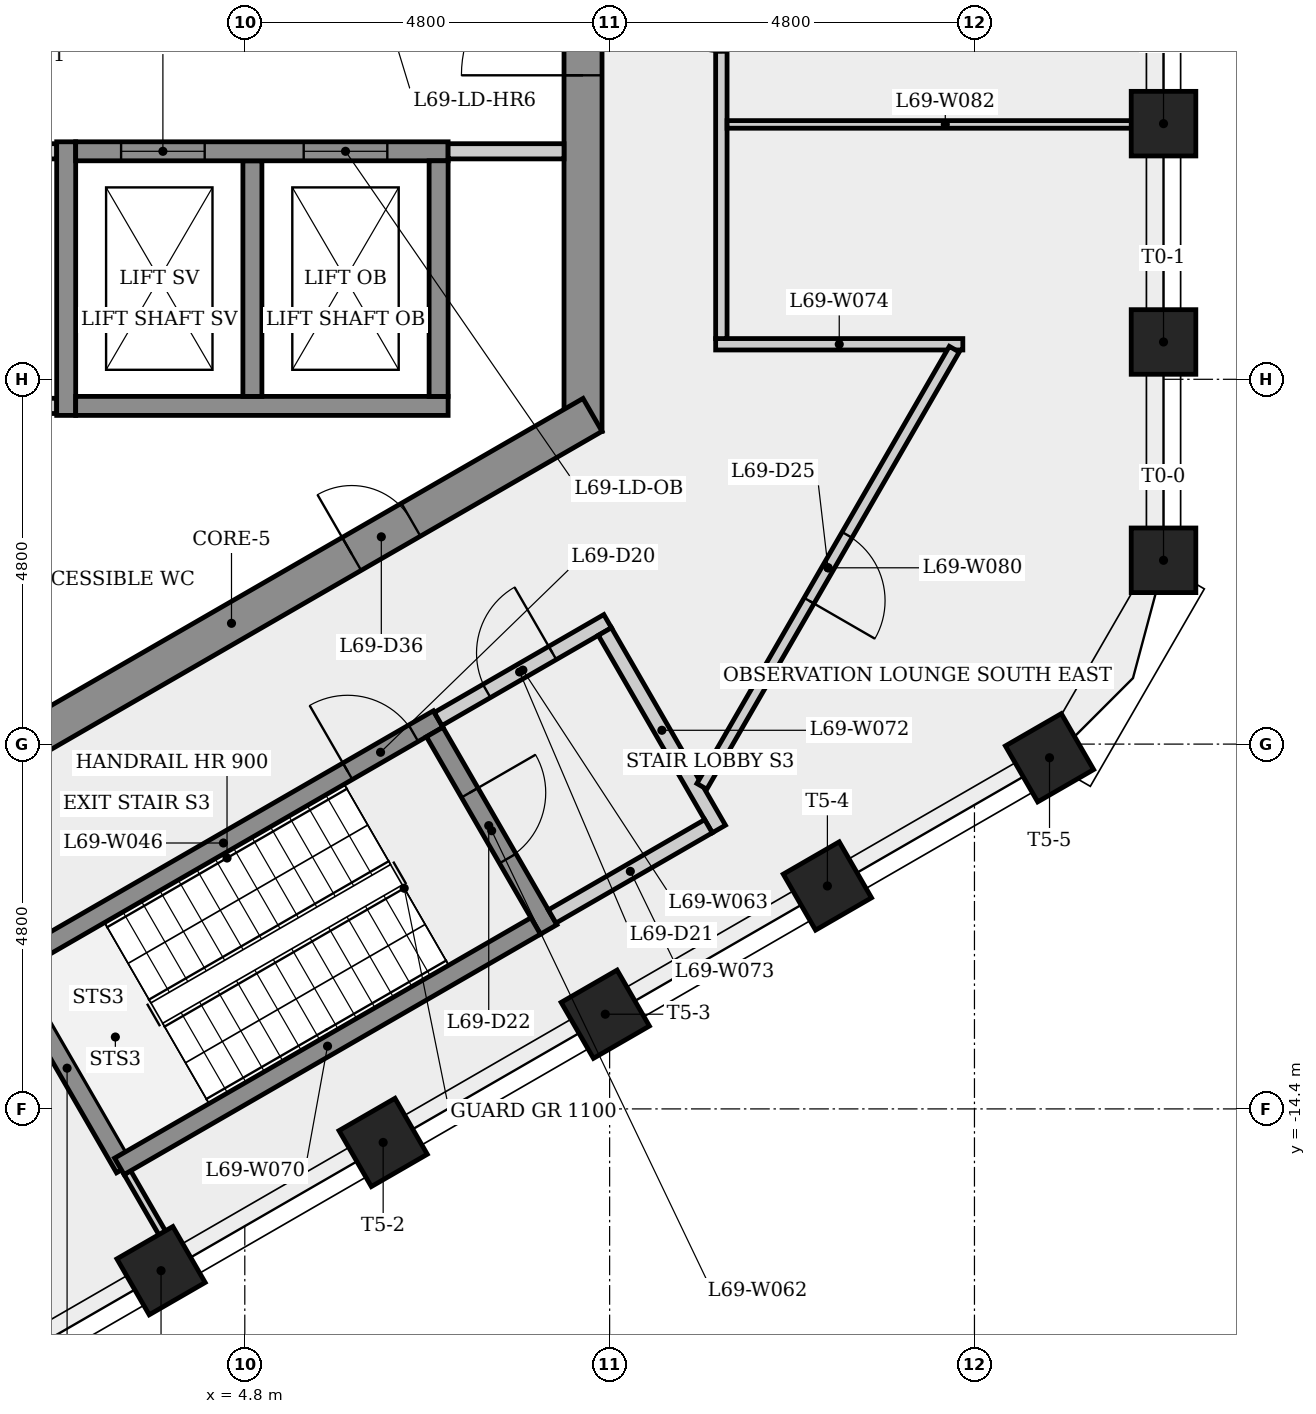
"""IFC4 building model, lengths in metres.
Left out: names, types, materials, properties, quantities, classifications, styles, units other than length and angle.
Written with IfcOpenShell. Run it as: python <this file> out.ifc"""

import sys

from ifc_helpers import new_model, si_unit, direction, frame, frame_2d, origin, origin_2d, place, context, subcontext, project, spatial, rectangle, extrude, element, fill, save


model = new_model("IFC4")
c1 = context("Model", 3, precision=1e-05, world=origin(), true_north=direction((0.0, 1.0)))
c2 = subcontext(c1, "Body", "Model", "MODEL_VIEW")
j1 = project(units=[si_unit("LENGTHUNIT", "METRE"), si_unit("PLANEANGLEUNIT", "RADIAN")], contexts=[c1])
p1 = place(None, origin())
s1 = spatial("IfcSite", under=j1, at=p1, CompositionType="ELEMENT")
p2 = place(p1, origin())
s2 = spatial("IfcBuilding", under=s1, at=p2, CompositionType="ELEMENT")
p3 = place(p2, frame((0.0, 0.0, 257.9)))
s3 = spatial("IfcBuildingStorey", under=s2, at=p3, CompositionType="ELEMENT", Elevation=257.9)
p4 = place(p3, frame((9.25, -5.485, 0.0), z_axis=(0.0, 0.0, 1.0), x_axis=(0.0, 1.0, 0.0)))
e1 = element("IfcWall", 1, at=p4, inside=s3, PredefinedType="SHEAR", context=c2, shape_type="SweptSolid", body=[
    extrude(rectangle(XDim=10.97, YDim=0.5, at=frame_2d((5.485, 0.0))), origin(), (0.0, 0.0, 1.0), 5.0),
])
p5 = place(p4, frame((4.685, 0.0, 0.0)))
e2 = element("IfcOpeningElement", 2, at=p5, cuts=e1, PredefinedType="OPENING", context=c2, shape_type="SweptSolid", body=[
    extrude(rectangle(XDim=1.6, YDim=2.1, at=frame_2d((0.8, 1.05))), frame((0.0, 0.26, 0.0), z_axis=(0.0, -1.0, 0.0), x_axis=(1.0, 0.0, 0.0)), (0.0, 0.0, 1.0), 0.52),
])
p6 = place(p3, frame((-0.125, -10.753, 0.0), z_axis=(0.0, 0.0, 1.0), x_axis=(0.866023993627, 0.500002442456, 0.0)))
e3 = element("IfcWall", 3, at=p6, inside=s3, PredefinedType="SHEAR", context=c2, shape_type="SweptSolid", body=[
    extrude(rectangle(XDim=10.97, YDim=0.5, at=frame_2d((5.485, 0.0))), origin(), (0.0, 0.0, 1.0), 5.0),
])
p7 = place(p6, frame((7.311, 0.0, 0.0)))
e4 = element("IfcOpeningElement", 4, at=p7, cuts=e3, PredefinedType="OPENING", context=c2, shape_type="SweptSolid", body=[
    extrude(rectangle(XDim=0.9, YDim=2.1, at=frame_2d((0.45, 1.05))), frame((0.0, 0.26, 0.0), z_axis=(0.0, -1.0, 0.0), x_axis=(1.0, 0.0, 0.0)), (0.0, 0.0, 1.0), 0.52),
])
for number, where, z_axis, x_axis in (
    (5, (16.887, -7.181, 0.0), (0.0, 0.0, 1.0), (1.0, 0.0, 0.0)),
    (6, (16.887, -4.309, 0.0), (0.0, 0.0, 1.0), (1.0, 0.0, 0.0)),
    (7, (16.887, -1.436, 0.0), (0.0, 0.0, 1.0), (1.0, 0.0, 0.0)),
    (8, (3.698, -16.529, 0.0), (0.0, 0.0, 1.0), (0.5, -0.866, 0.0)),
    (9, (6.62, -14.841, 0.0), (0.0, 0.0, 1.0), (0.5, -0.866, 0.0)),
    (10, (9.543, -13.154, 0.0), (0.0, 0.0, 1.0), (0.5, -0.866, 0.0)),
    (11, (12.465, -11.467, 0.0), (0.0, 0.0, 1.0), (0.5, -0.866, 0.0)),
    (12, (15.387, -9.78, 0.0), (0.0, 0.0, 1.0), (0.5, -0.866, 0.0)),
):
    element("IfcColumn", number, at=place(p3, frame(where, z_axis=z_axis, x_axis=x_axis)), inside=s3, PredefinedType="COLUMN", context=c2, shape_type="SweptSolid", body=[
        extrude(rectangle(XDim=0.85, YDim=0.85, at=origin_2d()), origin(), (0.0, 0.0, 1.0), 5.0),
    ])
p8 = place(p3, frame((-9.0, -5.15, 0.0), z_axis=(0.0, 0.0, 1.0), x_axis=(1.0, 0.0, 0.0)))
e13 = element("IfcWall", 13, at=p8, inside=s3, PredefinedType="PARTITIONING", context=c2, shape_type="SweptSolid", body=[
    extrude(rectangle(XDim=11.325, YDim=0.2, at=frame_2d((5.663, 0.0))), origin(), (0.0, 0.0, 1.0), 4.6),
])
p9 = place(p3, frame((-9.0, -1.8, 0.0), z_axis=(0.0, 0.0, 1.0), x_axis=(1.0, 0.0, 0.0)))
e14 = element("IfcWall", 14, at=p9, inside=s3, PredefinedType="PARTITIONING", context=c2, shape_type="SweptSolid", body=[
    extrude(rectangle(XDim=11.325, YDim=0.2, at=frame_2d((5.663, 0.0))), origin(), (0.0, 0.0, 1.0), 4.6),
])
p10 = place(p9, frame((2.185, 0.0, 0.0)))
e15 = element("IfcOpeningElement", 15, at=p10, cuts=e14, PredefinedType="OPENING", context=c2, shape_type="SweptSolid", body=[
    extrude(rectangle(XDim=0.9, YDim=2.1, at=frame_2d((0.45, 1.05))), frame((0.0, 0.11, 0.0), z_axis=(0.0, -1.0, 0.0), x_axis=(1.0, 0.0, 0.0)), (0.0, 0.0, 1.0), 0.22),
])
p11 = place(p9, frame((6.71, 0.0, 0.0)))
e16 = element("IfcOpeningElement", 16, at=p11, cuts=e14, PredefinedType="OPENING", context=c2, shape_type="SweptSolid", body=[
    extrude(rectangle(XDim=0.9, YDim=2.1, at=frame_2d((0.45, 1.05))), frame((0.0, 0.11, 0.0), z_axis=(0.0, -1.0, 0.0), x_axis=(1.0, 0.0, 0.0)), (0.0, 0.0, 1.0), 0.22),
])
p12 = place(p9, frame((9.713, 0.0, 0.0)))
e17 = element("IfcOpeningElement", 17, at=p12, cuts=e14, PredefinedType="OPENING", context=c2, shape_type="SweptSolid", body=[
    extrude(rectangle(XDim=0.9, YDim=2.1, at=frame_2d((0.45, 1.05))), frame((0.0, 0.11, 0.0), z_axis=(0.0, -1.0, 0.0), x_axis=(1.0, 0.0, 0.0)), (0.0, 0.0, 1.0), 0.22),
])
p13 = place(p3, frame((1.693, -12.532, 0.0), z_axis=(0.0, 0.0, 1.0), x_axis=(0.866031063448, 0.499990197047, 0.0)))
e18 = element("IfcWall", 18, at=p13, inside=s3, PredefinedType="SHEAR", context=c2, shape_type="SweptSolid", body=[
    extrude(rectangle(XDim=6.525, YDim=0.25, at=frame_2d((3.263, 0.0))), origin(), (0.0, 0.0, 1.0), 4.6),
])
p14 = place(p13, frame((5.15, 0.0, 0.0)))
e19 = element("IfcOpeningElement", 19, at=p14, cuts=e18, PredefinedType="OPENING", context=c2, shape_type="SweptSolid", body=[
    extrude(rectangle(XDim=1.0, YDim=2.1, at=frame_2d((0.5, 1.05))), frame((0.0, 0.135, 0.0), z_axis=(0.0, -1.0, 0.0), x_axis=(1.0, 0.0, 0.0)), (0.0, 0.0, 1.0), 0.27),
])
p15 = place(p3, frame((2.45, -5.275, 0.0), z_axis=(0.0, 0.0, 1.0), x_axis=(0.0, 1.0, 0.0)))
e20 = element("IfcWall", 20, at=p15, inside=s3, PredefinedType="SHEAR", context=c2, shape_type="SweptSolid", body=[
    extrude(rectangle(XDim=3.6, YDim=0.25, at=frame_2d((1.8, 0.0))), origin(), (0.0, 0.0, 1.0), 4.6),
])
p16 = place(p3, frame((3.221, -15.178, 0.0), z_axis=(0.0, 0.0, 1.0), x_axis=(-0.500014901547, 0.866016800201, 0.0)))
e21 = element("IfcWall", 21, at=p16, inside=s3, PredefinedType="SHEAR", context=c2, shape_type="SweptSolid", body=[
    extrude(rectangle(XDim=3.035, YDim=0.25, at=frame_2d((1.518, 0.0))), origin(), (0.0, 0.0, 1.0), 4.6),
])
p17 = place(p3, frame((3.947, -16.436, 0.0), z_axis=(0.0, 0.0, 1.0), x_axis=(-0.499977339252, 0.866038486578, 0.0)))
e22 = element("IfcWall", 22, at=p17, inside=s3, PredefinedType="PARTITIONING", context=c2, shape_type="SweptSolid", body=[
    extrude(rectangle(XDim=1.382, YDim=0.1, at=frame_2d((0.691, 0.0))), origin(), (0.0, 0.0, 1.0), 4.6),
])
p18 = place(p3, frame((2.575, -5.15, 0.0), z_axis=(0.0, 0.0, 1.0), x_axis=(1.0, 0.0, 0.0)))
e23 = element("IfcWall", 23, at=p18, inside=s3, PredefinedType="SHEAR", context=c2, shape_type="SweptSolid", body=[
    extrude(rectangle(XDim=4.9, YDim=0.25, at=frame_2d((2.45, 0.0))), origin(), (0.0, 0.0, 1.0), 4.6),
])
p19 = place(p3, frame((4.9, -1.925, 0.0), z_axis=(0.0, 0.0, 1.0), x_axis=(0.0, -1.0, 0.0)))
e24 = element("IfcWall", 24, at=p19, inside=s3, PredefinedType="SHEAR", context=c2, shape_type="SweptSolid", body=[
    extrude(rectangle(XDim=3.1, YDim=0.25, at=frame_2d((1.55, 0.0))), origin(), (0.0, 0.0, 1.0), 5.0),
])
p20 = place(p3, frame((2.575, -1.8, 0.0), z_axis=(0.0, 0.0, 1.0), x_axis=(1.0, 0.0, 0.0)))
e25 = element("IfcWall", 25, at=p20, inside=s3, PredefinedType="SHEAR", context=c2, shape_type="SweptSolid", body=[
    extrude(rectangle(XDim=4.9, YDim=0.25, at=frame_2d((2.45, 0.0))), origin(), (0.0, 0.0, 1.0), 4.6),
])
p21 = place(p20, frame((0.597, 0.0, 0.0)))
e26 = element("IfcOpeningElement", 26, at=p21, cuts=e25, PredefinedType="OPENING", context=c2, shape_type="SweptSolid", body=[
    extrude(rectangle(XDim=1.1, YDim=2.1, at=frame_2d((0.55, 1.05))), frame((0.0, 0.135, 0.0), z_axis=(0.0, -1.0, 0.0), x_axis=(1.0, 0.0, 0.0)), (0.0, 0.0, 1.0), 0.27),
])
p22 = place(p20, frame((3.0, 0.0, 0.0)))
e27 = element("IfcOpeningElement", 27, at=p22, cuts=e25, PredefinedType="OPENING", context=c2, shape_type="SweptSolid", body=[
    extrude(rectangle(XDim=1.1, YDim=2.1, at=frame_2d((0.55, 1.05))), frame((0.0, 0.135, 0.0), z_axis=(0.0, -1.0, 0.0), x_axis=(1.0, 0.0, 0.0)), (0.0, 0.0, 1.0), 0.27),
])
p23 = place(p3, frame((7.298, -9.441, 0.0), z_axis=(0.0, 0.0, 1.0), x_axis=(0.50002537861, -0.866010750942, 0.0)))
e28 = element("IfcWall", 28, at=p23, inside=s3, PredefinedType="SHEAR", context=c2, shape_type="SweptSolid", body=[
    extrude(rectangle(XDim=3.0, YDim=0.25, at=frame_2d((1.5, 0.0))), origin(), (0.0, 0.0, 1.0), 4.6),
])
p24 = place(p23, frame((0.923, 0.0, 0.0)))
e29 = element("IfcOpeningElement", 29, at=p24, cuts=e28, PredefinedType="OPENING", context=c2, shape_type="SweptSolid", body=[
    extrude(rectangle(XDim=1.0, YDim=2.1, at=frame_2d((0.5, 1.05))), frame((0.0, 0.135, 0.0), z_axis=(0.0, -1.0, 0.0), x_axis=(1.0, 0.0, 0.0)), (0.0, 0.0, 1.0), 0.27),
])
p25 = place(p3, frame((7.344, -9.27, 0.0), z_axis=(0.0, 0.0, 1.0), x_axis=(0.866005588531, 0.500034319456, 0.0)))
e30 = element("IfcWall", 30, at=p25, inside=s3, PredefinedType="PARTITIONING", context=c2, shape_type="SweptSolid", body=[
    extrude(rectangle(XDim=2.575, YDim=0.2, at=frame_2d((1.288, 0.0))), origin(), (0.0, 0.0, 1.0), 4.6),
])
p26 = place(p25, frame((0.738, 0.0, 0.0)))
e31 = element("IfcOpeningElement", 31, at=p26, cuts=e30, PredefinedType="OPENING", context=c2, shape_type="SweptSolid", body=[
    extrude(rectangle(XDim=1.0, YDim=2.1, at=frame_2d((0.5, 1.05))), frame((0.0, 0.11, 0.0), z_axis=(0.0, -1.0, 0.0), x_axis=(1.0, 0.0, 0.0)), (0.0, 0.0, 1.0), 0.22),
])
p27 = place(p3, frame((7.35, -1.925, 0.0), z_axis=(0.0, 0.0, 1.0), x_axis=(0.0, -1.0, 0.0)))
e32 = element("IfcWall", 32, at=p27, inside=s3, PredefinedType="SHEAR", context=c2, shape_type="SweptSolid", body=[
    extrude(rectangle(XDim=3.1, YDim=0.25, at=frame_2d((1.55, 0.0))), origin(), (0.0, 0.0, 1.0), 4.6),
])
p28 = place(p3, frame((8.627, -11.993, 0.0), z_axis=(0.0, 0.0, 1.0), x_axis=(-0.866032601554, -0.49998753289, 0.0)))
e33 = element("IfcWall", 33, at=p28, inside=s3, PredefinedType="SHEAR", context=c2, shape_type="SweptSolid", body=[
    extrude(rectangle(XDim=6.325, YDim=0.25, at=frame_2d((3.163, 0.0))), origin(), (0.0, 0.0, 1.0), 4.6),
])
p29 = place(p3, frame((9.0, -1.8, 0.0), z_axis=(0.0, 0.0, 1.0), x_axis=(-1.0, 0.0, 0.0)))
e34 = element("IfcWall", 34, at=p29, inside=s3, PredefinedType="PARTITIONING", context=c2, shape_type="SweptSolid", body=[
    extrude(rectangle(XDim=1.525, YDim=0.2, at=frame_2d((0.763, 0.0))), origin(), (0.0, 0.0, 1.0), 4.6),
])
p30 = place(p3, frame((9.537, -8.119, 0.0), z_axis=(0.0, 0.0, 1.0), x_axis=(0.499990139034, -0.866031096941, 0.0)))
e35 = element("IfcWall", 35, at=p30, inside=s3, PredefinedType="PARTITIONING", context=c2, shape_type="SweptSolid", body=[
    extrude(rectangle(XDim=3.0, YDim=0.2, at=frame_2d((1.5, 0.0))), origin(), (0.0, 0.0, 1.0), 4.6),
])
p31 = place(p3, frame((10.901, -10.681, 0.0), z_axis=(0.0, 0.0, 1.0), x_axis=(-0.866007538022, -0.500030943131, 0.0)))
e36 = element("IfcWall", 36, at=p31, inside=s3, PredefinedType="PARTITIONING", context=c2, shape_type="SweptSolid", body=[
    extrude(rectangle(XDim=2.375, YDim=0.2, at=frame_2d((1.188, 0.0))), origin(), (0.0, 0.0, 1.0), 4.6),
])
p32 = place(p3, frame((10.995, -4.339, 0.0), z_axis=(0.0, 0.0, 1.0), x_axis=(1.0, 0.0, 0.0)))
e37 = element("IfcWall", 37, at=p32, inside=s3, PredefinedType="PARTITIONING", context=c2, shape_type="SweptSolid", body=[
    extrude(rectangle(XDim=3.252, YDim=0.15, at=frame_2d((1.626, 0.0))), origin(), (0.0, 0.0, 1.0), 4.6),
])
p33 = place(p3, frame((11.07, -4.264, 0.0), z_axis=(0.0, 0.0, 1.0), x_axis=(0.0, 1.0, 0.0)))
e38 = element("IfcWall", 38, at=p33, inside=s3, PredefinedType="PARTITIONING", context=c2, shape_type="SweptSolid", body=[
    extrude(rectangle(XDim=8.678, YDim=0.15, at=frame_2d((4.339, 0.0))), origin(), (0.0, 0.0, 1.0), 4.6),
])
p34 = place(p33, frame((3.764, 0.0, 0.0)))
e39 = element("IfcOpeningElement", 39, at=p34, cuts=e38, PredefinedType="OPENING", context=c2, shape_type="SweptSolid", body=[
    extrude(rectangle(XDim=1.0, YDim=2.1, at=frame_2d((0.5, 1.05))), frame((0.0, 0.085, 0.0), z_axis=(0.0, -1.0, 0.0), x_axis=(1.0, 0.0, 0.0)), (0.0, 0.0, 1.0), 0.17),
])
p35 = place(p3, frame((14.135, -4.404, 0.0), z_axis=(0.0, 0.0, 1.0), x_axis=(-0.500001386856, -0.866024603081, 0.0)))
e40 = element("IfcWall", 40, at=p35, inside=s3, PredefinedType="PARTITIONING", context=c2, shape_type="SweptSolid", body=[
    extrude(rectangle(XDim=6.642, YDim=0.15, at=frame_2d((3.321, 0.0))), origin(), (0.0, 0.0, 1.0), 4.6),
])
p36 = place(p35, frame((2.821, 0.0, 0.0)))
e41 = element("IfcOpeningElement", 41, at=p36, cuts=e40, PredefinedType="OPENING", context=c2, shape_type="SweptSolid", body=[
    extrude(rectangle(XDim=1.0, YDim=2.1, at=frame_2d((0.5, 1.05))), frame((0.0, 0.085, 0.0), z_axis=(0.0, -1.0, 0.0), x_axis=(1.0, 0.0, 0.0)), (0.0, 0.0, 1.0), 0.17),
])
p37 = place(p3, frame((16.887, -1.446, 0.0), z_axis=(0.0, 0.0, 1.0), x_axis=(-1.0, 0.0, 0.0)))
e42 = element("IfcWall", 42, at=p37, inside=s3, PredefinedType="PARTITIONING", context=c2, shape_type="SweptSolid", body=[
    extrude(rectangle(XDim=5.742, YDim=0.1, at=frame_2d((2.871, 0.0))), origin(), (0.0, 0.0, 1.0), 4.6),
])
p38 = place(p21, origin())
e43 = element("IfcDoor", 43, at=p38, inside=s3, OperationType="SLIDING_TO_LEFT", PredefinedType="DOOR", context=c2, shape_type="SweptSolid", body=[
    extrude(rectangle(XDim=1.1, YDim=2.1, at=frame_2d((0.55, 1.05))), frame((0.0, 0.025, 0.0), z_axis=(0.0, -1.0, 0.0), x_axis=(1.0, 0.0, 0.0)), (0.0, 0.0, 1.0), 0.05),
])
fill(e26, e43)
p39 = place(p22, origin())
e44 = element("IfcDoor", 44, at=p39, inside=s3, OperationType="SLIDING_TO_LEFT", PredefinedType="DOOR", context=c2, shape_type="SweptSolid", body=[
    extrude(rectangle(XDim=1.1, YDim=2.1, at=frame_2d((0.55, 1.05))), frame((0.0, 0.025, 0.0), z_axis=(0.0, -1.0, 0.0), x_axis=(1.0, 0.0, 0.0)), (0.0, 0.0, 1.0), 0.05),
])
fill(e27, e44)
p40 = place(p14, origin())
e45 = element("IfcDoor", 45, at=p40, inside=s3, OperationType="SINGLE_SWING_LEFT", PredefinedType="DOOR", context=c2, shape_type="SweptSolid", body=[
    extrude(rectangle(XDim=1.0, YDim=2.1, at=frame_2d((0.5, 1.05))), frame((0.0, 0.025, 0.0), z_axis=(0.0, -1.0, 0.0), x_axis=(1.0, 0.0, 0.0)), (0.0, 0.0, 1.0), 0.05),
])
fill(e19, e45)
p41 = place(p26, origin())
e46 = element("IfcDoor", 46, at=p41, inside=s3, OperationType="SINGLE_SWING_RIGHT", PredefinedType="DOOR", context=c2, shape_type="SweptSolid", body=[
    extrude(rectangle(XDim=1.0, YDim=2.1, at=frame_2d((0.5, 1.05))), frame((0.0, 0.025, 0.0), z_axis=(0.0, -1.0, 0.0), x_axis=(1.0, 0.0, 0.0)), (0.0, 0.0, 1.0), 0.05),
])
fill(e31, e46)
p42 = place(p24, origin())
e47 = element("IfcDoor", 47, at=p42, inside=s3, OperationType="SINGLE_SWING_LEFT", PredefinedType="DOOR", context=c2, shape_type="SweptSolid", body=[
    extrude(rectangle(XDim=1.0, YDim=2.1, at=frame_2d((0.5, 1.05))), frame((0.0, 0.025, 0.0), z_axis=(0.0, -1.0, 0.0), x_axis=(1.0, 0.0, 0.0)), (0.0, 0.0, 1.0), 0.05),
])
fill(e29, e47)
p43 = place(p34, origin())
e48 = element("IfcDoor", 48, at=p43, inside=s3, OperationType="SINGLE_SWING_RIGHT", PredefinedType="DOOR", context=c2, shape_type="SweptSolid", body=[
    extrude(rectangle(XDim=1.0, YDim=2.1, at=frame_2d((0.5, 1.05))), frame((0.0, 0.025, 0.0), z_axis=(0.0, -1.0, 0.0), x_axis=(1.0, 0.0, 0.0)), (0.0, 0.0, 1.0), 0.05),
])
fill(e39, e48)
p44 = place(p36, origin())
e49 = element("IfcDoor", 49, at=p44, inside=s3, OperationType="SINGLE_SWING_RIGHT", PredefinedType="DOOR", context=c2, shape_type="SweptSolid", body=[
    extrude(rectangle(XDim=1.0, YDim=2.1, at=frame_2d((0.5, 1.05))), frame((0.0, 0.025, 0.0), z_axis=(0.0, -1.0, 0.0), x_axis=(1.0, 0.0, 0.0)), (0.0, 0.0, 1.0), 0.05),
])
fill(e41, e49)
p45 = place(p7, origin())
e50 = element("IfcDoor", 50, at=p45, inside=s3, OperationType="SINGLE_SWING_LEFT", PredefinedType="DOOR", context=c2, shape_type="SweptSolid", body=[
    extrude(rectangle(XDim=0.9, YDim=2.1, at=frame_2d((0.45, 1.05))), frame((0.0, 0.025, 0.0), z_axis=(0.0, -1.0, 0.0), x_axis=(1.0, 0.0, 0.0)), (0.0, 0.0, 1.0), 0.05),
])
fill(e4, e50)
p46 = place(p5, origin())
e51 = element("IfcDoor", 51, at=p46, inside=s3, OperationType="SINGLE_SWING_LEFT", PredefinedType="DOOR", context=c2, shape_type="SweptSolid", body=[
    extrude(rectangle(XDim=1.6, YDim=2.1, at=frame_2d((0.8, 1.05))), frame((0.0, 0.025, 0.0), z_axis=(0.0, -1.0, 0.0), x_axis=(1.0, 0.0, 0.0)), (0.0, 0.0, 1.0), 0.05),
])
fill(e2, e51)
save(model, sys.argv[1])
